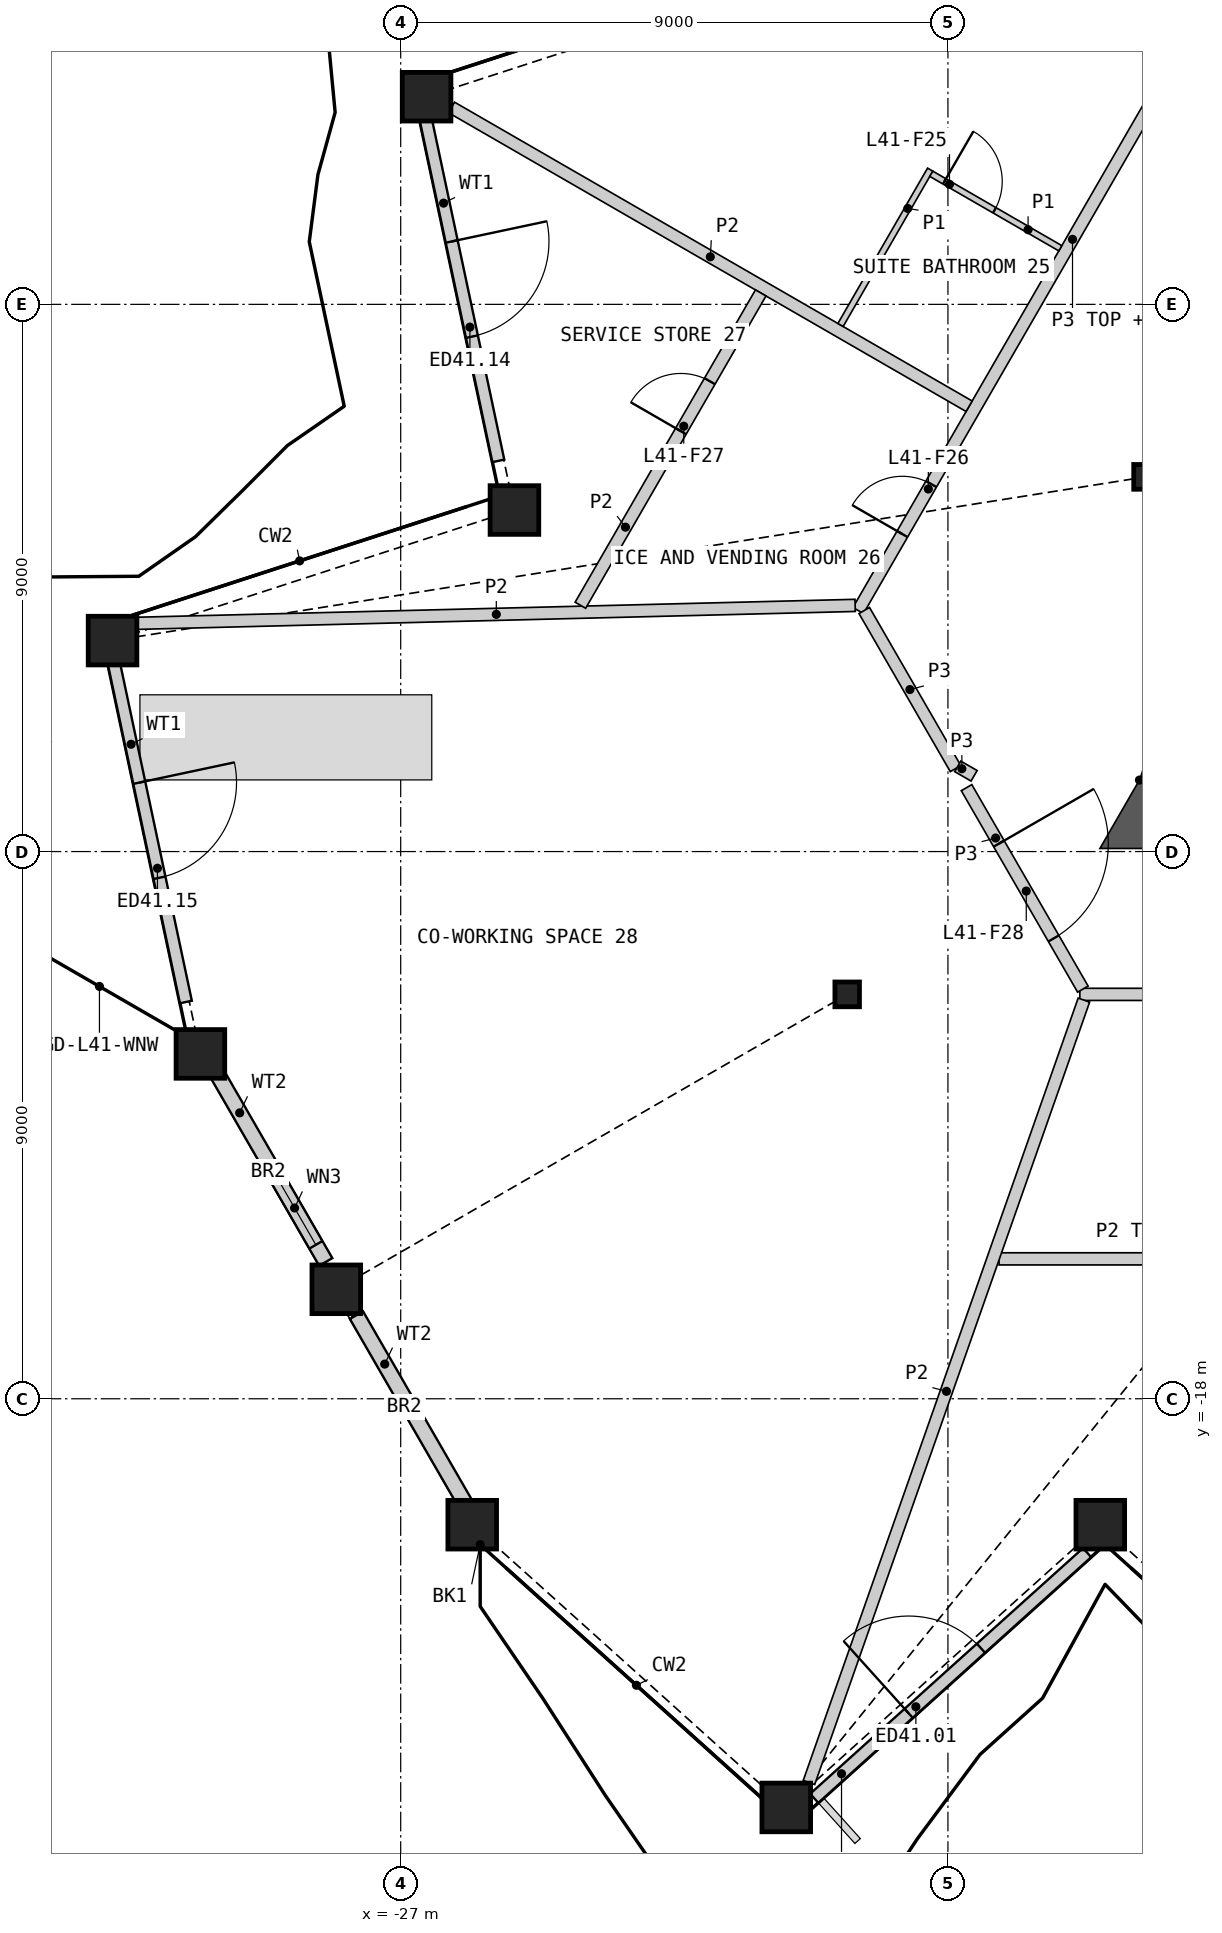
"""IFC4 building model, lengths in metres.
Left out: names, types, materials, properties, quantities, classifications, styles, units other than length and angle.
Written with IfcOpenShell. Run it as: python <this file> out.ifc"""

import sys

from ifc_helpers import new_model, si_unit, direction, frame, frame_2d, origin, origin_2d, place, context, subcontext, project, spatial, polyline, rectangle, hollow_rectangle, i_section, outline, extrude, element, fill, save


model = new_model("IFC4")
c1 = context("Model", 3, precision=1e-05, world=origin(), true_north=direction((0.0, 1.0)))
c2 = subcontext(c1, "Body", "Model", "MODEL_VIEW")
j1 = project(units=[si_unit("LENGTHUNIT", "METRE"), si_unit("PLANEANGLEUNIT", "RADIAN")], contexts=[c1])
p1 = place(None, origin())
s1 = spatial("IfcSite", under=j1, at=p1, CompositionType="ELEMENT")
p2 = place(p1, origin())
s2 = spatial("IfcBuilding", under=s1, at=p2, CompositionType="ELEMENT")
p3 = place(p2, frame((0.0, 0.0, 190.8)))
s3 = spatial("IfcBuildingStorey", under=s2, at=p3, CompositionType="ELEMENT", Elevation=190.8)
for number, where, z_axis, x_axis in (
    (1, (-25.823, -20.071, 0.0), (0.0, 0.0, 1.0), (1.0, 0.0, 0.0)),
    (2, (-20.659, -24.722, 0.0), (0.0, 0.0, 1.0), (1.0, 0.0, 0.0)),
    (3, (-15.494, -20.071, 0.0), (0.0, 0.0, 1.0), (1.0, 0.0, 0.0)),
    (4, (-26.574, 3.415, 0.0), (0.0, 0.0, 1.0), (1.0, 0.0, 0.0)),
    (5, (-25.129, -3.383, 0.0), (0.0, 0.0, 1.0), (1.0, 0.0, 0.0)),
    (6, (-31.739, -5.53, 0.0), (0.0, 0.0, 1.0), (1.0, 0.0, 0.0)),
    (7, (-30.294, -12.328, 0.0), (0.0, 0.0, 1.0), (1.0, 0.0, 0.0)),
    (8, (-28.059, -16.2, 0.0), (0.0, 0.0, 1.0), (1.0, 0.0, 0.0)),
):
    element("IfcColumn", number, at=place(p3, frame(where, z_axis=z_axis, x_axis=x_axis)), inside=s3, PredefinedType="COLUMN", context=c2, shape_type="SweptSolid", body=[
        extrude(hollow_rectangle(XDim=0.8, YDim=0.8, WallThickness=0.05, at=origin_2d()), origin(), (0.0, 0.0, 1.0), 3.6),
    ])
for number, where, z_axis, x_axis in (
    (9, (-14.743, -2.837, 0.0), (0.0, 0.0, 1.0), (1.0, 0.0, 0.0)),
    (10, (-19.657, -11.349, 0.0), (0.0, 0.0, 1.0), (1.0, 0.0, 0.0)),
):
    element("IfcColumn", number, at=place(p3, frame(where, z_axis=z_axis, x_axis=x_axis)), inside=s3, PredefinedType="COLUMN", context=c2, shape_type="SweptSolid", body=[
        extrude(i_section(OverallWidth=0.404, OverallDepth=0.407, WebThickness=0.027, FlangeThickness=0.044, at=origin_2d()), origin(), (0.0, 0.0, 1.0), 3.6),
    ])
p4 = place(p3, frame((-20.199, -24.571, 0.0), z_axis=(0.0, 0.0, 1.0), x_axis=(0.743151394339, 0.669123310827, 0.0)))
e11 = element("IfcWall", 11, at=p4, inside=s3, PredefinedType="SOLIDWALL", context=c2, shape_type="SweptSolid", body=[
    extrude(rectangle(XDim=6.039, YDim=0.2, at=frame_2d((3.019, 0.0))), origin(), (0.0, 0.0, 1.0), 2.701),
])
p5 = place(p4, frame((2.089, 0.0, 0.0)))
e12 = element("IfcOpeningElement", 12, at=p5, cuts=e11, PredefinedType="OPENING", context=c2, shape_type="SweptSolid", body=[
    extrude(rectangle(XDim=1.6, YDim=2.4, at=frame_2d((0.8, 1.2))), frame((0.0, 0.11, 0.0), z_axis=(0.0, -1.0, 0.0), x_axis=(1.0, 0.0, 0.0)), (0.0, 0.0, 1.0), 0.22),
])
p6 = place(p3, frame((-26.595, 3.078, 0.0), z_axis=(0.0, 0.0, 1.0), x_axis=(0.207907263894, -0.978148541695, 0.0)))
e13 = element("IfcWall", 13, at=p6, inside=s3, PredefinedType="SOLIDWALL", context=c2, shape_type="SweptSolid", body=[
    extrude(rectangle(XDim=5.779, YDim=0.2, at=frame_2d((2.889, 0.0))), origin(), (0.0, 0.0, 1.0), 2.701),
])
p7 = place(p6, frame((2.089, 0.0, 0.0)))
e14 = element("IfcOpeningElement", 14, at=p7, cuts=e13, PredefinedType="OPENING", context=c2, shape_type="SweptSolid", body=[
    extrude(rectangle(XDim=1.6, YDim=2.4, at=frame_2d((0.8, 1.2))), frame((0.0, 0.11, 0.0), z_axis=(0.0, -1.0, 0.0), x_axis=(1.0, 0.0, 0.0)), (0.0, 0.0, 1.0), 0.22),
])
p8 = place(p3, frame((-31.734, -5.822, 0.0), z_axis=(0.0, 0.0, 1.0), x_axis=(0.207907263894, -0.978148541695, 0.0)))
e15 = element("IfcWall", 15, at=p8, inside=s3, PredefinedType="SOLIDWALL", context=c2, shape_type="SweptSolid", body=[
    extrude(rectangle(XDim=5.779, YDim=0.2, at=frame_2d((2.889, 0.0))), origin(), (0.0, 0.0, 1.0), 2.701),
])
p9 = place(p8, frame((2.089, 0.0, 0.0)))
e16 = element("IfcOpeningElement", 16, at=p9, cuts=e15, PredefinedType="OPENING", context=c2, shape_type="SweptSolid", body=[
    extrude(rectangle(XDim=1.6, YDim=2.4, at=frame_2d((0.8, 1.2))), frame((0.0, 0.11, 0.0), z_axis=(0.0, -1.0, 0.0), x_axis=(1.0, 0.0, 0.0)), (0.0, 0.0, 1.0), 0.22),
])
p10 = place(p3, frame((-30.12, -12.48, 0.0), z_axis=(0.0, 0.0, 1.0), x_axis=(0.500034075199, -0.866005729565, 0.0)))
e17 = element("IfcWall", 17, at=p10, inside=s3, PredefinedType="SOLIDWALL", context=c2, shape_type="SweptSolid", body=[
    extrude(rectangle(XDim=3.775, YDim=0.25, at=frame_2d((1.888, 0.0))), origin(), (0.0, 0.0, 1.0), 2.701),
])
p11 = place(p10, frame((2.05, 0.0, 1.7)))
e18 = element("IfcOpeningElement", 18, at=p11, cuts=e17, PredefinedType="OPENING", context=c2, shape_type="SweptSolid", body=[
    extrude(rectangle(XDim=1.4, YDim=0.8, at=frame_2d((0.7, 0.4))), frame((0.0, 0.135, 0.0), z_axis=(0.0, -1.0, 0.0), x_axis=(1.0, 0.0, 0.0)), (0.0, 0.0, 1.0), 0.27),
])
p12 = place(p3, frame((-27.727, -16.625, 0.0), z_axis=(0.0, 0.0, 1.0), x_axis=(0.499995303914, -0.866028115054, 0.0)))
e19 = element("IfcWall", 19, at=p12, inside=s3, PredefinedType="SOLIDWALL", context=c2, shape_type="SweptSolid", body=[
    extrude(rectangle(XDim=3.718, YDim=0.25, at=frame_2d((1.859, 0.0))), origin(), (0.0, 0.0, 1.0), 2.701),
])
p13 = place(p3, frame((-12.65, -4.763, 0.0), z_axis=(0.0, 0.0, 1.0), x_axis=(-0.499996681051, -0.866027319972, 0.0)))
e20 = element("IfcWall", 20, at=p13, inside=s3, PredefinedType="SHEAR", context=c2, shape_type="SweptSolid", body=[
    extrude(rectangle(XDim=3.75, YDim=0.75, at=frame_2d((1.875, 0.0))), origin(), (0.0, 0.0, 1.0), 3.25),
])
p14 = place(p3, origin())
e21 = element("IfcWall", 21, at=p14, inside=s3, PredefinedType="SHEAR", context=c2, shape_type="SweptSolid", body=[
    extrude(outline(polyline([(-14.851, -7.824), (-14.201, -8.199), (-14.201, -8.949), (-15.5, -8.949), (-14.851, -7.824)])), origin(), (0.0, 0.0, 1.0), 3.25),
])
p15 = place(p3, frame((-19.476, -5.035, 0.0), z_axis=(0.0, 0.0, 1.0), x_axis=(0.500000757641, 0.86602496636, 0.0)))
e22 = element("IfcWall", 22, at=p15, inside=s3, PredefinedType="PARTITIONING", context=c2, shape_type="SweptSolid", body=[
    extrude(rectangle(XDim=28.198, YDim=0.2, at=frame_2d((14.099, 0.0))), origin(), (0.0, 0.0, 1.0), 3.25),
])
p16 = place(p15, frame((25.796, 0.0, 0.0)))
e23 = element("IfcOpeningElement", 23, at=p16, cuts=e22, PredefinedType="OPENING", context=c2, shape_type="SweptSolid", body=[
    extrude(rectangle(XDim=0.95, YDim=2.1, at=frame_2d((0.475, 1.05))), frame((0.0, 0.11, 0.0), z_axis=(0.0, -1.0, 0.0), x_axis=(1.0, 0.0, 0.0)), (0.0, 0.0, 1.0), 0.22),
])
p17 = place(p15, frame((14.603, 0.0, 0.0)))
e24 = element("IfcOpeningElement", 24, at=p17, cuts=e22, PredefinedType="OPENING", context=c2, shape_type="SweptSolid", body=[
    extrude(rectangle(XDim=1.1, YDim=2.1, at=frame_2d((0.55, 1.05))), frame((0.0, 0.11, 0.0), z_axis=(0.0, -1.0, 0.0), x_axis=(1.0, 0.0, 0.0)), (0.0, 0.0, 1.0), 0.22),
])
p18 = place(p15, frame((11.993, 0.0, 0.0)))
e25 = element("IfcOpeningElement", 25, at=p18, cuts=e22, PredefinedType="OPENING", context=c2, shape_type="SweptSolid", body=[
    extrude(rectangle(XDim=1.1, YDim=2.1, at=frame_2d((0.55, 1.05))), frame((0.0, 0.11, 0.0), z_axis=(0.0, -1.0, 0.0), x_axis=(1.0, 0.0, 0.0)), (0.0, 0.0, 1.0), 0.22),
])
p19 = place(p15, frame((1.452, 0.0, 0.0)))
e26 = element("IfcOpeningElement", 26, at=p19, cuts=e22, PredefinedType="OPENING", context=c2, shape_type="SweptSolid", body=[
    extrude(rectangle(XDim=0.95, YDim=2.1, at=frame_2d((0.475, 1.05))), frame((0.0, 0.11, 0.0), z_axis=(0.0, -1.0, 0.0), x_axis=(1.0, 0.0, 0.0)), (0.0, 0.0, 1.0), 0.22),
])
p20 = place(p3, frame((-15.831, -11.349, 0.0), z_axis=(0.0, 0.0, 1.0), x_axis=(1.0, 0.0, 0.0)))
e27 = element("IfcWall", 27, at=p20, inside=s3, PredefinedType="PARTITIONING", context=c2, shape_type="SweptSolid", body=[
    extrude(rectangle(XDim=5.789, YDim=0.2, at=frame_2d((2.894, 0.0))), origin(), (0.0, 0.0, 1.0), 3.25),
])
p21 = place(p3, frame((-17.694, -7.949, 0.0), z_axis=(0.0, 0.0, 1.0), x_axis=(0.499989446428, -0.866031496806, 0.0)))
e28 = element("IfcWall", 28, at=p21, inside=s3, PredefinedType="PARTITIONING", context=c2, shape_type="SweptSolid", body=[
    extrude(rectangle(XDim=3.826, YDim=0.2, at=frame_2d((1.913, 0.0))), origin(), (0.0, 0.0, 1.0), 3.25),
])
p22 = place(p21, frame((1.064, 0.0, 0.0)))
e29 = element("IfcOpeningElement", 29, at=p22, cuts=e28, PredefinedType="OPENING", context=c2, shape_type="SweptSolid", body=[
    extrude(rectangle(XDim=1.8, YDim=2.1, at=frame_2d((0.9, 1.05))), frame((0.0, 0.11, 0.0), z_axis=(0.0, -1.0, 0.0), x_axis=(1.0, 0.0, 0.0)), (0.0, 0.0, 1.0), 0.22),
])
p23 = place(p3, frame((-19.376, -5.035, 0.0), z_axis=(0.0, 0.0, 1.0), x_axis=(0.499952404951, -0.866052881055, 0.0)))
e30 = element("IfcWall", 30, at=p23, inside=s3, PredefinedType="PARTITIONING", context=c2, shape_type="SweptSolid", body=[
    extrude(rectangle(XDim=3.002, YDim=0.2, at=frame_2d((1.501, 0.0))), origin(), (0.0, 0.0, 1.0), 3.25),
])
p24 = place(p3, frame((-17.838, -7.599, 0.0), z_axis=(0.0, 0.0, 1.0), x_axis=(0.866054481515, -0.499949632511, 0.0)))
e31 = element("IfcWall", 31, at=p24, inside=s3, PredefinedType="PARTITIONING", context=c2, shape_type="SweptSolid", body=[
    extrude(rectangle(XDim=0.31, YDim=0.2, at=frame_2d((0.155, 0.0))), origin(), (0.0, 0.0, 1.0), 3.25),
])
p25 = place(p3, frame((-17.159, -15.699, 0.0), z_axis=(0.0, 0.0, 1.0), x_axis=(1.0, 0.0, 0.0)))
e32 = element("IfcWall", 32, at=p25, inside=s3, PredefinedType="PARTITIONING", context=c2, shape_type="SweptSolid", body=[
    extrude(rectangle(XDim=17.059, YDim=0.2, at=frame_2d((8.53, 0.0))), origin(), (0.0, 0.0, 1.0), 2.404),
])
p26 = place(p25, frame((7.655, 0.0, 0.0)))
e33 = element("IfcOpeningElement", 33, at=p26, cuts=e32, PredefinedType="OPENING", context=c2, shape_type="SweptSolid", body=[
    extrude(rectangle(XDim=0.95, YDim=2.1, at=frame_2d((0.475, 1.05))), frame((0.0, 0.11, 0.0), z_axis=(0.0, -1.0, 0.0), x_axis=(1.0, 0.0, 0.0)), (0.0, 0.0, 1.0), 0.22),
])
p27 = place(p3, frame((-20.286, -24.312, 0.0), z_axis=(0.0, 0.0, 1.0), x_axis=(0.331517429591, 0.943449094481, 0.0)))
e34 = element("IfcWall", 34, at=p27, inside=s3, PredefinedType="PARTITIONING", context=c2, shape_type="SweptSolid", body=[
    extrude(rectangle(XDim=13.639, YDim=0.2, at=frame_2d((6.82, 0.0))), origin(), (0.0, 0.0, 1.0), 2.404),
])
p28 = place(p3, frame((-31.329, -5.246, 0.0), z_axis=(0.0, 0.0, 1.0), x_axis=(0.999689013957, 0.024937429174, 0.0)))
e35 = element("IfcWall", 35, at=p28, inside=s3, PredefinedType="PARTITIONING", context=c2, shape_type="SweptSolid", body=[
    extrude(rectangle(XDim=11.807, YDim=0.2, at=frame_2d((5.903, 0.0))), origin(), (0.0, 0.0, 1.0), 2.404),
])
p29 = place(p3, frame((-26.164, 3.239, 0.0), z_axis=(0.0, 0.0, 1.0), x_axis=(0.866025932773, -0.499999083763, 0.0)))
e36 = element("IfcWall", 36, at=p29, inside=s3, PredefinedType="PARTITIONING", context=c2, shape_type="SweptSolid", body=[
    extrude(rectangle(XDim=9.83, YDim=0.2, at=frame_2d((4.915, 0.0))), origin(), (0.0, 0.0, 1.0), 2.404),
])
p30 = place(p3, frame((-24.045, -4.949, 0.0), z_axis=(0.0, 0.0, 1.0), x_axis=(0.500016988964, 0.866015594979, 0.0)))
e37 = element("IfcWall", 37, at=p30, inside=s3, PredefinedType="PARTITIONING", context=c2, shape_type="SweptSolid", body=[
    extrude(rectangle(XDim=5.931, YDim=0.2, at=frame_2d((2.966, 0.0))), origin(), (0.0, 0.0, 1.0), 2.404),
])
p31 = place(p30, frame((3.305, 0.0, 0.0)))
e38 = element("IfcOpeningElement", 38, at=p31, cuts=e37, PredefinedType="OPENING", context=c2, shape_type="SweptSolid", body=[
    extrude(rectangle(XDim=0.95, YDim=2.1, at=frame_2d((0.475, 1.05))), frame((0.0, 0.11, 0.0), z_axis=(0.0, -1.0, 0.0), x_axis=(1.0, 0.0, 0.0)), (0.0, 0.0, 1.0), 0.22),
])
p32 = place(p3, frame((-19.767, -0.339, 0.0), z_axis=(0.0, 0.0, 1.0), x_axis=(0.499939757307, 0.866060182126, 0.0)))
e39 = element("IfcWall", 39, at=p32, inside=s3, PredefinedType="PARTITIONING", context=c2, shape_type="SweptSolid", body=[
    extrude(rectangle(XDim=2.95, YDim=0.1, at=frame_2d((1.475, 0.0))), origin(), (0.0, 0.0, 1.0), 2.404),
])
p33 = place(p3, frame((-18.273, 2.147, 0.0), z_axis=(0.0, 0.0, 1.0), x_axis=(0.866014668023, -0.500018594424, 0.0)))
e40 = element("IfcWall", 40, at=p33, inside=s3, PredefinedType="PARTITIONING", context=c2, shape_type="SweptSolid", body=[
    extrude(rectangle(XDim=2.45, YDim=0.1, at=frame_2d((1.225, 0.0))), origin(), (0.0, 0.0, 1.0), 2.404),
])
p34 = place(p33, frame((0.25, 0.0, 0.0)))
e41 = element("IfcOpeningElement", 41, at=p34, cuts=e40, PredefinedType="OPENING", context=c2, shape_type="SweptSolid", body=[
    extrude(rectangle(XDim=0.95, YDim=2.1, at=frame_2d((0.475, 1.05))), frame((0.0, 0.06, 0.0), z_axis=(0.0, -1.0, 0.0), x_axis=(1.0, 0.0, 0.0)), (0.0, 0.0, 1.0), 0.12),
])
p35 = place(p5, origin())
e42 = element("IfcDoor", 42, at=p35, inside=s3, OperationType="DOUBLE_DOOR_SINGLE_SWING", PredefinedType="DOOR", context=c2, shape_type="SweptSolid", body=[
    extrude(rectangle(XDim=1.6, YDim=2.4, at=frame_2d((0.8, 1.2))), frame((0.0, 0.025, 0.0), z_axis=(0.0, -1.0, 0.0), x_axis=(1.0, 0.0, 0.0)), (0.0, 0.0, 1.0), 0.05),
])
fill(e12, e42)
p36 = place(p7, origin())
e43 = element("IfcDoor", 43, at=p36, inside=s3, OperationType="DOUBLE_DOOR_SINGLE_SWING", PredefinedType="DOOR", context=c2, shape_type="SweptSolid", body=[
    extrude(rectangle(XDim=1.6, YDim=2.4, at=frame_2d((0.8, 1.2))), frame((0.0, 0.025, 0.0), z_axis=(0.0, -1.0, 0.0), x_axis=(1.0, 0.0, 0.0)), (0.0, 0.0, 1.0), 0.05),
])
fill(e14, e43)
p37 = place(p9, origin())
e44 = element("IfcDoor", 44, at=p37, inside=s3, OperationType="DOUBLE_DOOR_SINGLE_SWING", PredefinedType="DOOR", context=c2, shape_type="SweptSolid", body=[
    extrude(rectangle(XDim=1.6, YDim=2.4, at=frame_2d((0.8, 1.2))), frame((0.0, 0.025, 0.0), z_axis=(0.0, -1.0, 0.0), x_axis=(1.0, 0.0, 0.0)), (0.0, 0.0, 1.0), 0.05),
])
fill(e16, e44)
p38 = place(p11, origin())
e45 = element("IfcWindow", 45, at=p38, inside=s3, PartitioningType="SINGLE_PANEL", PredefinedType="WINDOW", context=c2, shape_type="SweptSolid", body=[
    extrude(rectangle(XDim=1.4, YDim=0.8, at=frame_2d((0.7, 0.4))), frame((0.0, 0.03, 0.0), z_axis=(0.0, -1.0, 0.0), x_axis=(1.0, 0.0, 0.0)), (0.0, 0.0, 1.0), 0.06),
])
fill(e18, e45)
p39 = place(p34, origin())
e46 = element("IfcDoor", 46, at=p39, inside=s3, OperationType="SINGLE_SWING_LEFT", PredefinedType="DOOR", context=c2, shape_type="SweptSolid", body=[
    extrude(rectangle(XDim=0.95, YDim=2.1, at=frame_2d((0.475, 1.05))), frame((0.0, 0.025, 0.0), z_axis=(0.0, -1.0, 0.0), x_axis=(1.0, 0.0, 0.0)), (0.0, 0.0, 1.0), 0.05),
])
fill(e41, e46)
p40 = place(p19, origin())
e47 = element("IfcDoor", 47, at=p40, inside=s3, OperationType="SINGLE_SWING_LEFT", PredefinedType="DOOR", context=c2, shape_type="SweptSolid", body=[
    extrude(rectangle(XDim=0.95, YDim=2.1, at=frame_2d((0.475, 1.05))), frame((0.0, 0.025, 0.0), z_axis=(0.0, -1.0, 0.0), x_axis=(1.0, 0.0, 0.0)), (0.0, 0.0, 1.0), 0.05),
])
fill(e26, e47)
p41 = place(p31, origin())
e48 = element("IfcDoor", 48, at=p41, inside=s3, OperationType="SINGLE_SWING_LEFT", PredefinedType="DOOR", context=c2, shape_type="SweptSolid", body=[
    extrude(rectangle(XDim=0.95, YDim=2.1, at=frame_2d((0.475, 1.05))), frame((0.0, 0.025, 0.0), z_axis=(0.0, -1.0, 0.0), x_axis=(1.0, 0.0, 0.0)), (0.0, 0.0, 1.0), 0.05),
])
fill(e38, e48)
p42 = place(p22, origin())
e49 = element("IfcDoor", 49, at=p42, inside=s3, OperationType="DOUBLE_DOOR_SINGLE_SWING", PredefinedType="DOOR", context=c2, shape_type="SweptSolid", body=[
    extrude(rectangle(XDim=1.8, YDim=2.1, at=frame_2d((0.9, 1.05))), frame((0.0, 0.025, 0.0), z_axis=(0.0, -1.0, 0.0), x_axis=(1.0, 0.0, 0.0)), (0.0, 0.0, 1.0), 0.05),
])
fill(e29, e49)
save(model, sys.argv[1])
